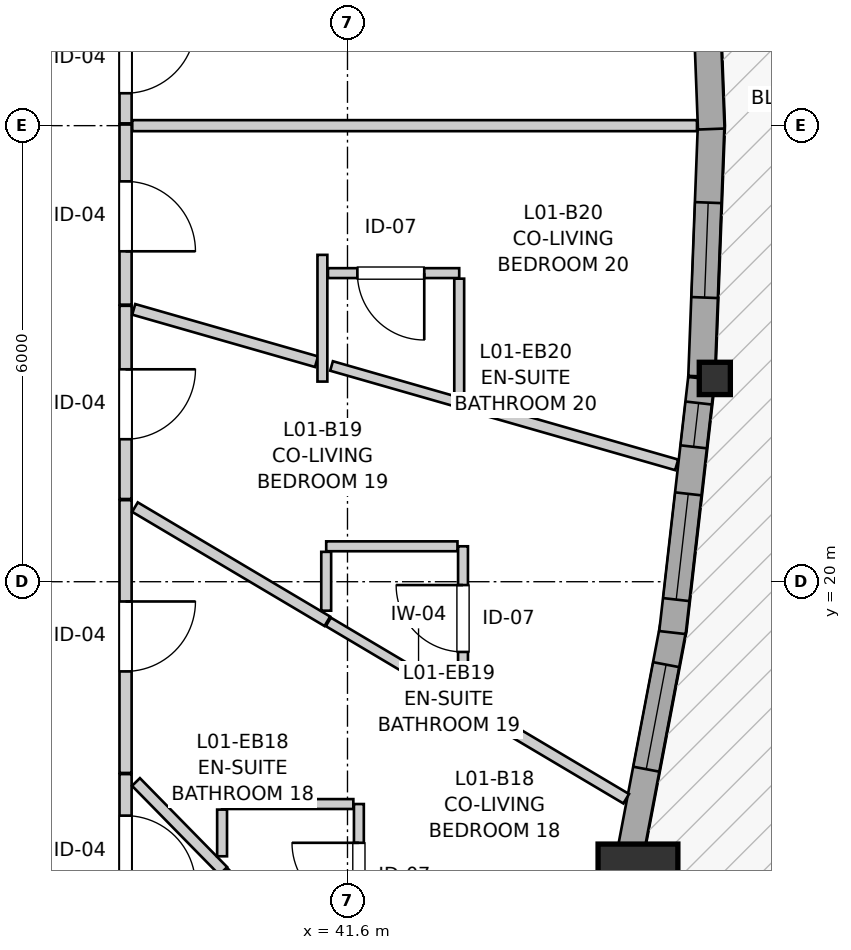
"""IFC4 building model, lengths in metres.
Left out: names, types, materials, properties, quantities, classifications, styles, units other than length and angle.
Written with IfcOpenShell. Run it as: python <this file> out.ifc"""

import sys

from ifc_helpers import new_model, si_unit, direction, frame, frame_2d, origin, origin_2d, place, context, subcontext, project, spatial, rectangle, i_section, extrude, source, transform, mapped, element, fill, save


model = new_model("IFC4")
c1 = context("Model", 3, precision=1e-05, world=origin(), true_north=direction((0.0, 1.0)))
c2 = subcontext(c1, "Body", "Model", "MODEL_VIEW")
j1 = project(units=[si_unit("LENGTHUNIT", "METRE"), si_unit("PLANEANGLEUNIT", "RADIAN")], contexts=[c1])
p1 = place(None, origin())
s1 = spatial("IfcSite", under=j1, at=p1, CompositionType="ELEMENT")
p2 = place(p1, origin())
s2 = spatial("IfcBuilding", under=s1, at=p2, CompositionType="ELEMENT")
p3 = place(p2, frame((0.0, 0.0, 7.8)))
s3 = spatial("IfcBuildingStorey", under=s2, at=p3, CompositionType="ELEMENT", Elevation=7.8)
m1 = source(origin(), c2, "Body", "SweptSolid", [
    extrude(rectangle(XDim=1.05, YDim=1.05, at=origin_2d()), origin(), (0.0, 0.0, 1.0), 2.94),
])
p4 = place(p3, frame((45.422, 16.023, 0.0), z_axis=(0.0, 0.0, 1.0), x_axis=(1.0, 0.0, 0.0)))
e1 = element("IfcColumn", 1, at=p4, inside=s3, PredefinedType="COLUMN", context=c2, shape_type="MappedRepresentation", body=[
    mapped(m1, transform((0.0, 0.0, 0.0), x_axis=(1.0, 0.0, 0.0), y_axis=(0.0, 1.0, 0.0), z_axis=(0.0, 0.0, 1.0), scale=1.0)),
])
m2 = source(origin(), c2, "Body", "SweptSolid", [
    extrude(i_section(OverallWidth=0.409, OverallDepth=0.425, WebThickness=0.03, FlangeThickness=0.048, FilletRadius=0.015, at=origin_2d()), origin(), (0.0, 0.0, 1.0), 2.94),
])
p5 = place(p3, frame((46.433, 22.675, 0.0), z_axis=(0.0, 0.0, 1.0), x_axis=(1.0, 0.0, 0.0)))
e2 = element("IfcColumn", 2, at=p5, inside=s3, PredefinedType="PILASTER", context=c2, shape_type="MappedRepresentation", body=[
    mapped(m2, transform((0.0, 0.0, 0.0), x_axis=(1.0, 0.0, 0.0), y_axis=(0.0, 1.0, 0.0), z_axis=(0.0, 0.0, 1.0), scale=1.0)),
])
p6 = place(p3, frame((45.306, 16.351, 0.0), z_axis=(0.0, 0.0, 1.0), x_axis=(0.186681017514, 0.982420580861, 0.0)))
e3 = element("IfcWall", 3, at=p6, inside=s3, PredefinedType="SOLIDWALL", context=c2, shape_type="SweptSolid", body=[
    extrude(rectangle(XDim=3.123, YDim=0.35, at=frame_2d((1.562, 0.0))), origin(), (0.0, 0.0, 1.0), 2.42),
])
p7 = place(p6, frame((1.204, 0.0, 0.82)))
e4 = element("IfcOpeningElement", 4, at=p7, cuts=e3, PredefinedType="OPENING", context=c2, shape_type="SweptSolid", body=[
    extrude(rectangle(XDim=1.4, YDim=1.35, at=frame_2d((0.7, 0.675))), frame((0.0, 0.185, 0.0), z_axis=(0.0, -1.0, 0.0), x_axis=(1.0, 0.0, 0.0)), (0.0, 0.0, 1.0), 0.37),
])
p8 = place(p3, frame((45.875, 19.331, 0.0), z_axis=(0.0, 0.0, 1.0), x_axis=(0.113329685842, 0.99355743785, 0.0)))
e5 = element("IfcWall", 5, at=p8, inside=s3, PredefinedType="SOLIDWALL", context=c2, shape_type="SweptSolid", body=[
    extrude(rectangle(XDim=3.365, YDim=0.35, at=frame_2d((1.683, 0.0))), origin(), (0.0, 0.0, 1.0), 2.42),
])
p9 = place(p8, frame((0.437, 0.0, 0.82)))
e6 = element("IfcOpeningElement", 6, at=p9, cuts=e5, PredefinedType="OPENING", context=c2, shape_type="SweptSolid", body=[
    extrude(rectangle(XDim=1.4, YDim=1.35, at=frame_2d((0.7, 0.675))), frame((0.0, 0.185, 0.0), z_axis=(0.0, -1.0, 0.0), x_axis=(1.0, 0.0, 0.0)), (0.0, 0.0, 1.0), 0.37),
])
p10 = place(p8, frame((2.459, 0.0, 0.82)))
e7 = element("IfcOpeningElement", 7, at=p10, cuts=e5, PredefinedType="OPENING", context=c2, shape_type="SweptSolid", body=[
    extrude(rectangle(XDim=0.58, YDim=1.35, at=frame_2d((0.29, 0.675))), frame((0.0, 0.185, 0.0), z_axis=(0.0, -1.0, 0.0), x_axis=(1.0, 0.0, 0.0)), (0.0, 0.0, 1.0), 0.37),
])
p11 = place(p3, frame((46.259, 22.701, 0.0), z_axis=(0.0, 0.0, 1.0), x_axis=(0.038015581842, 0.99927714651, 0.0)))
e8 = element("IfcWall", 8, at=p11, inside=s3, PredefinedType="SOLIDWALL", context=c2, shape_type="SweptSolid", body=[
    extrude(rectangle(XDim=3.346, YDim=0.35, at=frame_2d((1.673, 0.0))), origin(), (0.0, 0.0, 1.0), 2.42),
])
p12 = place(p11, frame((1.038, 0.0, 0.82)))
e9 = element("IfcOpeningElement", 9, at=p12, cuts=e8, PredefinedType="OPENING", context=c2, shape_type="SweptSolid", body=[
    extrude(rectangle(XDim=1.25, YDim=1.35, at=frame_2d((0.625, 0.675))), frame((0.0, 0.185, 0.0), z_axis=(0.0, -1.0, 0.0), x_axis=(1.0, 0.0, 0.0)), (0.0, 0.0, 1.0), 0.37),
])
p13 = place(p3, frame((46.386, 25.955, 0.0), z_axis=(0.0, 0.0, 1.0), x_axis=(-0.038063081658, 0.99927533834, 0.0)))
e10 = element("IfcWall", 10, at=p13, inside=s3, PredefinedType="SOLIDWALL", context=c2, shape_type="SweptSolid", body=[
    extrude(rectangle(XDim=3.066, YDim=0.35, at=frame_2d((1.533, 0.0))), origin(), (0.0, 0.0, 1.0), 2.42),
])
p14 = place(p13, frame((1.063, 0.0, 0.82)))
e11 = element("IfcOpeningElement", 11, at=p14, cuts=e10, PredefinedType="OPENING", context=c2, shape_type="SweptSolid", body=[
    extrude(rectangle(XDim=0.95, YDim=1.35, at=frame_2d((0.475, 0.675))), frame((0.0, 0.185, 0.0), z_axis=(0.0, -1.0, 0.0), x_axis=(1.0, 0.0, 0.0)), (0.0, 0.0, 1.0), 0.37),
])
p15 = place(p3, frame((38.68, 21.073, 0.0), z_axis=(0.0, 0.0, 1.0), x_axis=(0.0, -1.0, 0.0)))
e12 = element("IfcWall", 12, at=p15, inside=s3, PredefinedType="PARTITIONING", context=c2, shape_type="SweptSolid", body=[
    extrude(rectangle(XDim=3.589, YDim=0.16, at=frame_2d((1.794, 0.0))), origin(), (0.0, 0.0, 1.0), 2.94),
])
p16 = place(p15, frame((1.333, 0.0, 0.0)))
e13 = element("IfcOpeningElement", 13, at=p16, cuts=e12, PredefinedType="OPENING", context=c2, shape_type="SweptSolid", body=[
    extrude(rectangle(XDim=0.92, YDim=2.1, at=frame_2d((0.46, 1.05))), frame((0.0, 0.09, 0.0), z_axis=(0.0, -1.0, 0.0), x_axis=(1.0, 0.0, 0.0)), (0.0, 0.0, 1.0), 0.18),
])
p17 = place(p3, frame((38.68, 23.63, 0.0), z_axis=(0.0, 0.0, 1.0), x_axis=(0.0, -1.0, 0.0)))
e14 = element("IfcWall", 14, at=p17, inside=s3, PredefinedType="PARTITIONING", context=c2, shape_type="SweptSolid", body=[
    extrude(rectangle(XDim=2.542, YDim=0.16, at=frame_2d((1.271, 0.0))), origin(), (0.0, 0.0, 1.0), 2.94),
])
p18 = place(p17, frame((0.835, 0.0, 0.0)))
e15 = element("IfcOpeningElement", 15, at=p18, cuts=e14, PredefinedType="OPENING", context=c2, shape_type="SweptSolid", body=[
    extrude(rectangle(XDim=0.92, YDim=2.1, at=frame_2d((0.46, 1.05))), frame((0.0, 0.09, 0.0), z_axis=(0.0, -1.0, 0.0), x_axis=(1.0, 0.0, 0.0)), (0.0, 0.0, 1.0), 0.18),
])
p19 = place(p3, frame((38.68, 26.015, 0.0), z_axis=(0.0, 0.0, 1.0), x_axis=(0.0, -1.0, 0.0)))
e16 = element("IfcWall", 16, at=p19, inside=s3, PredefinedType="PARTITIONING", context=c2, shape_type="SweptSolid", body=[
    extrude(rectangle(XDim=2.37, YDim=0.16, at=frame_2d((1.185, 0.0))), origin(), (0.0, 0.0, 1.0), 2.94),
])
p20 = place(p19, frame((0.748, 0.0, 0.0)))
e17 = element("IfcOpeningElement", 17, at=p20, cuts=e16, PredefinedType="OPENING", context=c2, shape_type="SweptSolid", body=[
    extrude(rectangle(XDim=0.92, YDim=2.1, at=frame_2d((0.46, 1.05))), frame((0.0, 0.09, 0.0), z_axis=(0.0, -1.0, 0.0), x_axis=(1.0, 0.0, 0.0)), (0.0, 0.0, 1.0), 0.18),
])
p21 = place(p3, frame((38.68, 28.095, 0.0), z_axis=(0.0, 0.0, 1.0), x_axis=(0.0, -1.0, 0.0)))
e18 = element("IfcWall", 18, at=p21, inside=s3, PredefinedType="PARTITIONING", context=c2, shape_type="SweptSolid", body=[
    extrude(rectangle(XDim=2.065, YDim=0.16, at=frame_2d((1.032, 0.0))), origin(), (0.0, 0.0, 1.0), 2.94),
])
p22 = place(p21, frame((0.749, 0.0, 0.0)))
e19 = element("IfcOpeningElement", 19, at=p22, cuts=e18, PredefinedType="OPENING", context=c2, shape_type="SweptSolid", body=[
    extrude(rectangle(XDim=0.92, YDim=2.1, at=frame_2d((0.46, 1.05))), frame((0.0, 0.09, 0.0), z_axis=(0.0, -1.0, 0.0), x_axis=(1.0, 0.0, 0.0)), (0.0, 0.0, 1.0), 0.18),
])
p23 = place(p3, frame((38.68, 17.469, 0.0), z_axis=(0.0, 0.0, 1.0), x_axis=(0.0, -1.0, 0.0)))
e20 = element("IfcWall", 20, at=p23, inside=s3, PredefinedType="PARTITIONING", context=c2, shape_type="SweptSolid", body=[
    extrude(rectangle(XDim=2.049, YDim=0.16, at=frame_2d((1.024, 0.0))), origin(), (0.0, 0.0, 1.0), 2.94),
])
p24 = place(p23, frame((0.546, 0.0, 0.0)))
e21 = element("IfcOpeningElement", 21, at=p24, cuts=e20, PredefinedType="OPENING", context=c2, shape_type="SweptSolid", body=[
    extrude(rectangle(XDim=0.92, YDim=2.1, at=frame_2d((0.46, 1.05))), frame((0.0, 0.09, 0.0), z_axis=(0.0, -1.0, 0.0), x_axis=(1.0, 0.0, 0.0)), (0.0, 0.0, 1.0), 0.18),
])
p25 = place(p3, frame((43.12, 18.566, 0.0), z_axis=(0.0, 0.0, 1.0), x_axis=(0.0, 1.0, 0.0)))
e22 = element("IfcWall", 22, at=p25, inside=s3, PredefinedType="PARTITIONING", context=c2, shape_type="SweptSolid", body=[
    extrude(rectangle(XDim=1.9, YDim=0.13, at=frame_2d((0.95, 0.0))), origin(), (0.0, 0.0, 1.0), 2.94),
])
p26 = place(p25, frame((0.51, 0.0, 0.0)))
e23 = element("IfcOpeningElement", 23, at=p26, cuts=e22, PredefinedType="OPENING", context=c2, shape_type="SweptSolid", body=[
    extrude(rectangle(XDim=0.88, YDim=2.05, at=frame_2d((0.44, 1.025))), frame((0.0, 0.075, 0.0), z_axis=(0.0, -1.0, 0.0), x_axis=(1.0, 0.0, 0.0)), (0.0, 0.0, 1.0), 0.15),
])
p27 = place(p3, frame((41.75, 15.175, 0.0), z_axis=(0.0, 0.0, 1.0), x_axis=(0.0, 1.0, 0.0)))
e24 = element("IfcWall", 24, at=p27, inside=s3, PredefinedType="PARTITIONING", context=c2, shape_type="SweptSolid", body=[
    extrude(rectangle(XDim=1.9, YDim=0.13, at=frame_2d((0.95, 0.0))), origin(), (0.0, 0.0, 1.0), 2.94),
])
p28 = place(p27, frame((0.51, 0.0, 0.0)))
e25 = element("IfcOpeningElement", 25, at=p28, cuts=e24, PredefinedType="OPENING", context=c2, shape_type="SweptSolid", body=[
    extrude(rectangle(XDim=0.88, YDim=2.05, at=frame_2d((0.44, 1.025))), frame((0.0, 0.075, 0.0), z_axis=(0.0, -1.0, 0.0), x_axis=(1.0, 0.0, 0.0)), (0.0, 0.0, 1.0), 0.15),
])
p29 = place(p3, frame((43.07, 24.06, 0.0), z_axis=(0.0, 0.0, 1.0), x_axis=(-1.0, 0.0, 0.0)))
e26 = element("IfcWall", 26, at=p29, inside=s3, PredefinedType="PARTITIONING", context=c2, shape_type="SweptSolid", body=[
    extrude(rectangle(XDim=1.727, YDim=0.13, at=frame_2d((0.864, 0.0))), origin(), (0.0, 0.0, 1.0), 2.94),
])
p30 = place(p29, frame((0.46, 0.0, 0.0)))
e27 = element("IfcOpeningElement", 27, at=p30, cuts=e26, PredefinedType="OPENING", context=c2, shape_type="SweptSolid", body=[
    extrude(rectangle(XDim=0.88, YDim=2.05, at=frame_2d((0.44, 1.025))), frame((0.0, 0.075, 0.0), z_axis=(0.0, -1.0, 0.0), x_axis=(1.0, 0.0, 0.0)), (0.0, 0.0, 1.0), 0.15),
])
p31 = place(p3, frame((38.768, 26.0, 0.0), z_axis=(0.0, 0.0, 1.0), x_axis=(1.0, 0.0, 0.0)))
e28 = element("IfcWall", 28, at=p31, inside=s3, PredefinedType="PARTITIONING", context=c2, shape_type="SweptSolid", body=[
    extrude(rectangle(XDim=7.43, YDim=0.145, at=frame_2d((3.715, 0.0))), origin(), (0.0, 0.0, 1.0), 2.94),
])
p32 = place(p3, frame((38.804, 20.981, 0.0), z_axis=(0.0, 0.0, 1.0), x_axis=(0.859905944731, -0.510452511225, 0.0)))
e29 = element("IfcWall", 29, at=p32, inside=s3, PredefinedType="PARTITIONING", context=c2, shape_type="SweptSolid", body=[
    extrude(rectangle(XDim=2.943, YDim=0.145, at=frame_2d((1.472, 0.0))), origin(), (0.0, 0.0, 1.0), 2.94),
])
p33 = place(p3, frame((43.055, 22.361, 0.0), z_axis=(0.0, 0.0, 1.0), x_axis=(0.961351316588, -0.275324619486, 0.0)))
e30 = element("IfcWall", 30, at=p33, inside=s3, PredefinedType="PARTITIONING", context=c2, shape_type="SweptSolid", body=[
    extrude(rectangle(XDim=2.992, YDim=0.145, at=frame_2d((1.496, 0.0))), origin(), (0.0, 0.0, 1.0), 2.94),
])
p34 = place(p3, frame((42.848, 18.581, 0.0), z_axis=(0.0, 0.0, 1.0), x_axis=(0.859872599939, -0.510508679528, 0.0)))
e31 = element("IfcWall", 31, at=p34, inside=s3, PredefinedType="PARTITIONING", context=c2, shape_type="SweptSolid", body=[
    extrude(rectangle(XDim=2.813, YDim=0.145, at=frame_2d((1.407, 0.0))), origin(), (0.0, 0.0, 1.0), 2.94),
])
p35 = place(p3, frame((38.788, 23.583, 0.0), z_axis=(0.0, 0.0, 1.0), x_axis=(0.961350656565, -0.275326924078, 0.0)))
e32 = element("IfcWall", 32, at=p35, inside=s3, PredefinedType="PARTITIONING", context=c2, shape_type="SweptSolid", body=[
    extrude(rectangle(XDim=2.501, YDim=0.145, at=frame_2d((1.251, 0.0))), origin(), (0.0, 0.0, 1.0), 2.94),
])
p36 = place(p3, frame((38.817, 17.365, 0.0), z_axis=(0.0, 0.0, 1.0), x_axis=(0.70029627305, -0.713852316626, 0.0)))
e33 = element("IfcWall", 33, at=p36, inside=s3, PredefinedType="PARTITIONING", context=c2, shape_type="SweptSolid", body=[
    extrude(rectangle(XDim=1.639, YDim=0.145, at=frame_2d((0.819, 0.0))), origin(), (0.0, 0.0, 1.0), 2.94),
])
p37 = place(p3, frame((41.39, 22.838, 0.0), z_axis=(0.0, 0.0, 1.0), x_axis=(0.961362810051, -0.275284484582, 0.0)))
e34 = element("IfcWall", 34, at=p37, inside=s3, PredefinedType="PARTITIONING", context=c2, shape_type="SweptSolid", body=[
    extrude(rectangle(XDim=1.717, YDim=0.13, at=frame_2d((0.858, 0.0))), origin(), (0.0, 0.0, 1.0), 2.94),
])
for number, where, z_axis, x_axis in (
    (35, (39.95, 17.075, 0.0), (0.0, 0.0, 1.0), (1.0, 0.0, 0.0)),
    (36, (41.32, 20.466, 0.0), (0.0, 0.0, 1.0), (1.0, 0.0, 0.0)),
):
    element("IfcWall", number, at=place(p3, frame(where, z_axis=z_axis, x_axis=x_axis)), inside=s3, PredefinedType="PARTITIONING", context=c2, shape_type="SweptSolid", body=[
        extrude(rectangle(XDim=1.727, YDim=0.13, at=frame_2d((0.864, 0.0))), origin(), (0.0, 0.0, 1.0), 2.94),
    ])
p38 = place(p3, frame((41.348, 19.471, 0.0), z_axis=(0.0, 0.0, 1.0), x_axis=(0.859825694404, -0.510587676352, 0.0)))
e37 = element("IfcWall", 37, at=p38, inside=s3, PredefinedType="PARTITIONING", context=c2, shape_type="SweptSolid", body=[
    extrude(rectangle(XDim=1.729, YDim=0.13, at=frame_2d((0.865, 0.0))), origin(), (0.0, 0.0, 1.0), 2.94),
])
p39 = place(p3, frame((43.07, 22.459, 0.0), z_axis=(0.0, 0.0, 1.0), x_axis=(0.0, 1.0, 0.0)))
e38 = element("IfcWall", 38, at=p39, inside=s3, PredefinedType="PARTITIONING", context=c2, shape_type="SweptSolid", body=[
    extrude(rectangle(XDim=1.528, YDim=0.13, at=frame_2d((0.764, 0.0))), origin(), (0.0, 0.0, 1.0), 2.508),
])
p40 = place(p3, frame((39.975, 16.184, 0.0), z_axis=(0.0, 0.0, 1.0), x_axis=(0.700338966049, -0.713810431861, 0.0)))
e39 = element("IfcWall", 39, at=p40, inside=s3, PredefinedType="PARTITIONING", context=c2, shape_type="SweptSolid", body=[
    extrude(rectangle(XDim=1.377, YDim=0.13, at=frame_2d((0.689, 0.0))), origin(), (0.0, 0.0, 1.0), 2.94),
])
p41 = place(p3, frame((41.27, 22.633, 0.0), z_axis=(0.0, 0.0, 1.0), x_axis=(0.0, 1.0, 0.0)))
e40 = element("IfcWall", 40, at=p41, inside=s3, PredefinedType="PARTITIONING", context=c2, shape_type="SweptSolid", body=[
    extrude(rectangle(XDim=1.667, YDim=0.13, at=frame_2d((0.833, 0.0))), origin(), (0.0, 0.0, 1.0), 2.94),
])
p42 = place(p3, frame((41.32, 19.619, 0.0), z_axis=(0.0, 0.0, 1.0), x_axis=(0.0, 1.0, 0.0)))
e41 = element("IfcWall", 41, at=p42, inside=s3, PredefinedType="PARTITIONING", context=c2, shape_type="SweptSolid", body=[
    extrude(rectangle(XDim=0.774, YDim=0.13, at=frame_2d((0.387, 0.0))), origin(), (0.0, 0.0, 1.0), 2.94),
])
p43 = place(p3, frame((39.95, 16.388, 0.0), z_axis=(0.0, 0.0, 1.0), x_axis=(0.0, 1.0, 0.0)))
e42 = element("IfcWall", 42, at=p43, inside=s3, PredefinedType="PARTITIONING", context=c2, shape_type="SweptSolid", body=[
    extrude(rectangle(XDim=0.614, YDim=0.13, at=frame_2d((0.307, 0.0))), origin(), (0.0, 0.0, 1.0), 2.94),
])
m3 = source(origin(), c2, "Body", "SweptSolid", [
    extrude(rectangle(XDim=1.4, YDim=1.35, at=frame_2d((0.7, 0.675))), frame((0.0, 0.03, 0.0), z_axis=(0.0, -1.0, 0.0), x_axis=(1.0, 0.0, 0.0)), (0.0, 0.0, 1.0), 0.06),
])
p44 = place(p7, origin())
e43 = element("IfcWindow", 43, at=p44, inside=s3, PartitioningType="SINGLE_PANEL", PredefinedType="WINDOW", context=c2, shape_type="MappedRepresentation", body=[
    mapped(m3, transform((0.0, 0.0, 0.0), x_axis=(1.0, 0.0, 0.0), y_axis=(0.0, 1.0, 0.0), z_axis=(0.0, 0.0, 1.0), scale=1.0)),
])
fill(e4, e43)
p45 = place(p9, origin())
e44 = element("IfcWindow", 44, at=p45, inside=s3, PartitioningType="SINGLE_PANEL", PredefinedType="WINDOW", context=c2, shape_type="MappedRepresentation", body=[
    mapped(m3, transform((0.0, 0.0, 0.0), x_axis=(1.0, 0.0, 0.0), y_axis=(0.0, 1.0, 0.0), z_axis=(0.0, 0.0, 1.0), scale=1.0)),
])
fill(e6, e44)
m4 = source(origin(), c2, "Body", "SweptSolid", [
    extrude(rectangle(XDim=0.58, YDim=1.35, at=frame_2d((0.29, 0.675))), frame((0.0, 0.03, 0.0), z_axis=(0.0, -1.0, 0.0), x_axis=(1.0, 0.0, 0.0)), (0.0, 0.0, 1.0), 0.06),
])
p46 = place(p10, origin())
e45 = element("IfcWindow", 45, at=p46, inside=s3, PartitioningType="SINGLE_PANEL", PredefinedType="WINDOW", context=c2, shape_type="MappedRepresentation", body=[
    mapped(m4, transform((0.0, 0.0, 0.0), x_axis=(1.0, 0.0, 0.0), y_axis=(0.0, 1.0, 0.0), z_axis=(0.0, 0.0, 1.0), scale=1.0)),
])
fill(e7, e45)
m5 = source(origin(), c2, "Body", "SweptSolid", [
    extrude(rectangle(XDim=1.25, YDim=1.35, at=frame_2d((0.625, 0.675))), frame((0.0, 0.03, 0.0), z_axis=(0.0, -1.0, 0.0), x_axis=(1.0, 0.0, 0.0)), (0.0, 0.0, 1.0), 0.06),
])
p47 = place(p12, origin())
e46 = element("IfcWindow", 46, at=p47, inside=s3, PartitioningType="SINGLE_PANEL", PredefinedType="WINDOW", context=c2, shape_type="MappedRepresentation", body=[
    mapped(m5, transform((0.0, 0.0, 0.0), x_axis=(1.0, 0.0, 0.0), y_axis=(0.0, 1.0, 0.0), z_axis=(0.0, 0.0, 1.0), scale=1.0)),
])
fill(e9, e46)
m6 = source(origin(), c2, "Body", "SweptSolid", [
    extrude(rectangle(XDim=0.92, YDim=2.1, at=frame_2d((0.46, 1.05))), frame((0.0, 0.025, 0.0), z_axis=(0.0, -1.0, 0.0), x_axis=(1.0, 0.0, 0.0)), (0.0, 0.0, 1.0), 0.05),
])
p48 = place(p16, origin())
e47 = element("IfcDoor", 47, at=p48, inside=s3, OperationType="SINGLE_SWING_LEFT", PredefinedType="DOOR", context=c2, shape_type="MappedRepresentation", body=[
    mapped(m6, transform((0.0, 0.0, 0.0), x_axis=(1.0, 0.0, 0.0), y_axis=(0.0, 1.0, 0.0), z_axis=(0.0, 0.0, 1.0), scale=1.0)),
])
fill(e13, e47)
p49 = place(p18, origin())
e48 = element("IfcDoor", 48, at=p49, inside=s3, OperationType="SINGLE_SWING_LEFT", PredefinedType="DOOR", context=c2, shape_type="MappedRepresentation", body=[
    mapped(m6, transform((0.0, 0.0, 0.0), x_axis=(1.0, 0.0, 0.0), y_axis=(0.0, 1.0, 0.0), z_axis=(0.0, 0.0, 1.0), scale=1.0)),
])
fill(e15, e48)
p50 = place(p20, origin())
e49 = element("IfcDoor", 49, at=p50, inside=s3, OperationType="SINGLE_SWING_RIGHT", PredefinedType="DOOR", context=c2, shape_type="MappedRepresentation", body=[
    mapped(m6, transform((0.0, 0.0, 0.0), x_axis=(1.0, 0.0, 0.0), y_axis=(0.0, 1.0, 0.0), z_axis=(0.0, 0.0, 1.0), scale=1.0)),
])
fill(e17, e49)
p51 = place(p22, origin())
e50 = element("IfcDoor", 50, at=p51, inside=s3, OperationType="SINGLE_SWING_LEFT", PredefinedType="DOOR", context=c2, shape_type="MappedRepresentation", body=[
    mapped(m6, transform((0.0, 0.0, 0.0), x_axis=(1.0, 0.0, 0.0), y_axis=(0.0, 1.0, 0.0), z_axis=(0.0, 0.0, 1.0), scale=1.0)),
])
fill(e19, e50)
p52 = place(p24, origin())
e51 = element("IfcDoor", 51, at=p52, inside=s3, OperationType="SINGLE_SWING_RIGHT", PredefinedType="DOOR", context=c2, shape_type="MappedRepresentation", body=[
    mapped(m6, transform((0.0, 0.0, 0.0), x_axis=(1.0, 0.0, 0.0), y_axis=(0.0, 1.0, 0.0), z_axis=(0.0, 0.0, 1.0), scale=1.0)),
])
fill(e21, e51)
m7 = source(origin(), c2, "Body", "SweptSolid", [
    extrude(rectangle(XDim=0.88, YDim=2.05, at=frame_2d((0.44, 1.025))), frame((0.0, 0.025, 0.0), z_axis=(0.0, -1.0, 0.0), x_axis=(1.0, 0.0, 0.0)), (0.0, 0.0, 1.0), 0.05),
])
p53 = place(p26, origin())
e52 = element("IfcDoor", 52, at=p53, inside=s3, OperationType="SINGLE_SWING_RIGHT", PredefinedType="DOOR", context=c2, shape_type="MappedRepresentation", body=[
    mapped(m7, transform((0.0, 0.0, 0.0), x_axis=(1.0, 0.0, 0.0), y_axis=(0.0, 1.0, 0.0), z_axis=(0.0, 0.0, 1.0), scale=1.0)),
])
fill(e23, e52)
p54 = place(p28, origin())
e53 = element("IfcDoor", 53, at=p54, inside=s3, OperationType="SINGLE_SWING_RIGHT", PredefinedType="DOOR", context=c2, shape_type="MappedRepresentation", body=[
    mapped(m7, transform((0.0, 0.0, 0.0), x_axis=(1.0, 0.0, 0.0), y_axis=(0.0, 1.0, 0.0), z_axis=(0.0, 0.0, 1.0), scale=1.0)),
])
fill(e25, e53)
p55 = place(p30, origin())
e54 = element("IfcDoor", 54, at=p55, inside=s3, OperationType="SINGLE_SWING_LEFT", PredefinedType="DOOR", context=c2, shape_type="MappedRepresentation", body=[
    mapped(m7, transform((0.0, 0.0, 0.0), x_axis=(1.0, 0.0, 0.0), y_axis=(0.0, 1.0, 0.0), z_axis=(0.0, 0.0, 1.0), scale=1.0)),
])
fill(e27, e54)
save(model, sys.argv[1])
